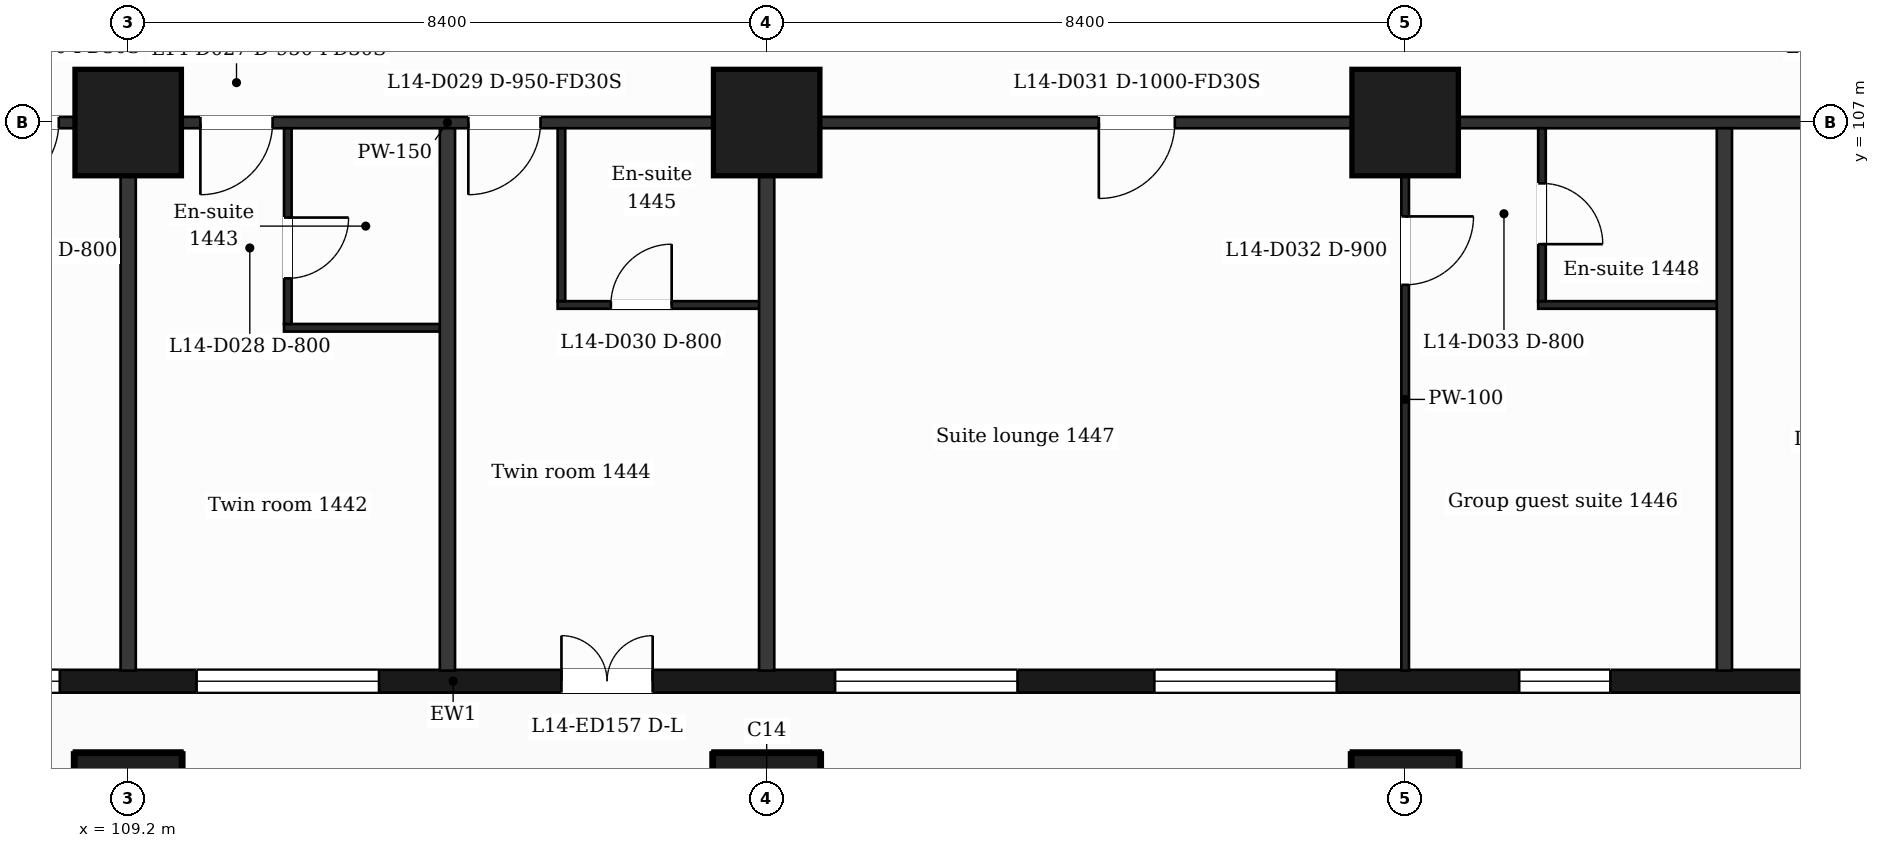
"""IFC4 building model, lengths in metres.
Left out: names, types, materials, properties, quantities, classifications, styles, units other than length and angle.
Written with IfcOpenShell. Run it as: python <this file> out.ifc"""

import sys

from ifc_helpers import new_model, si_unit, direction, frame, frame_2d, origin, origin_2d, place, context, subcontext, project, spatial, rectangle, extrude, element, fill, save


model = new_model("IFC4")
c1 = context("Model", 3, precision=1e-05, world=origin(), true_north=direction((0.0, 1.0)))
c2 = subcontext(c1, "Body", "Model", "MODEL_VIEW")
j1 = project(units=[si_unit("LENGTHUNIT", "METRE"), si_unit("PLANEANGLEUNIT", "RADIAN")], contexts=[c1])
p1 = place(None, origin())
s1 = spatial("IfcSite", under=j1, at=p1, CompositionType="ELEMENT")
p2 = place(p1, origin())
s2 = spatial("IfcBuilding", under=s1, at=p2, CompositionType="ELEMENT")
p3 = place(p2, frame((0.0, 0.0, 67.0)))
s3 = spatial("IfcBuildingStorey", under=s2, at=p3, CompositionType="ELEMENT", Elevation=67.0)
for number, where, z_axis, x_axis in (
    (1, (109.2, 98.0, 0.0), (0.0, 0.0, 1.0), (1.0, 0.0, 0.0)),
    (2, (117.6, 98.0, 0.0), (0.0, 0.0, 1.0), (1.0, 0.0, 0.0)),
    (3, (126.0, 98.0, 0.0), (0.0, 0.0, 1.0), (1.0, 0.0, 0.0)),
    (4, (109.2, 107.0, 0.0), (0.0, 0.0, 1.0), (1.0, 0.0, 0.0)),
    (5, (117.6, 107.0, 0.0), (0.0, 0.0, 1.0), (1.0, 0.0, 0.0)),
    (6, (126.0, 107.0, 0.0), (0.0, 0.0, 1.0), (1.0, 0.0, 0.0)),
):
    element("IfcColumn", number, at=place(p3, frame(where, z_axis=z_axis, x_axis=x_axis)), inside=s3, PredefinedType="COLUMN", context=c2, shape_type="SweptSolid", body=[
        extrude(rectangle(XDim=1.4, YDim=1.4, at=origin_2d()), origin(), (0.0, 0.0, 1.0), 3.5),
    ])
p4 = place(p3, frame((89.85, 99.65, 0.0), z_axis=(0.0, 0.0, 1.0), x_axis=(1.0, 0.0, 0.0)))
e7 = element("IfcWall", 7, at=p4, inside=s3, PredefinedType="SOLIDWALL", context=c2, shape_type="SweptSolid", body=[
    extrude(rectangle(XDim=47.25, YDim=0.3, at=frame_2d((23.625, 0.0))), origin(), (0.0, 0.0, 1.0), 3.18),
])
p5 = place(p4, frame((0.725, 0.0, 0.9)))
e8 = element("IfcOpeningElement", 8, at=p5, cuts=e7, PredefinedType="OPENING", context=c2, shape_type="SweptSolid", body=[
    extrude(rectangle(XDim=1.2, YDim=2.1, at=frame_2d((0.6, 1.05))), frame((0.0, 0.16, 0.0), z_axis=(0.0, -1.0, 0.0), x_axis=(1.0, 0.0, 0.0)), (0.0, 0.0, 1.0), 0.32),
])
p6 = place(p4, frame((3.45, 0.0, 0.9)))
e9 = element("IfcOpeningElement", 9, at=p6, cuts=e7, PredefinedType="OPENING", context=c2, shape_type="SweptSolid", body=[
    extrude(rectangle(XDim=2.4, YDim=2.1, at=frame_2d((1.2, 1.05))), frame((0.0, 0.16, 0.0), z_axis=(0.0, -1.0, 0.0), x_axis=(1.0, 0.0, 0.0)), (0.0, 0.0, 1.0), 0.32),
])
p7 = place(p4, frame((8.25, 0.0, 0.9)))
e10 = element("IfcOpeningElement", 10, at=p7, cuts=e7, PredefinedType="OPENING", context=c2, shape_type="SweptSolid", body=[
    extrude(rectangle(XDim=1.2, YDim=2.1, at=frame_2d((0.6, 1.05))), frame((0.0, 0.16, 0.0), z_axis=(0.0, -1.0, 0.0), x_axis=(1.0, 0.0, 0.0)), (0.0, 0.0, 1.0), 0.32),
])
p8 = place(p4, frame((12.45, 0.0, 0.9)))
e11 = element("IfcOpeningElement", 11, at=p8, cuts=e7, PredefinedType="OPENING", context=c2, shape_type="SweptSolid", body=[
    extrude(rectangle(XDim=1.2, YDim=2.1, at=frame_2d((0.6, 1.05))), frame((0.0, 0.16, 0.0), z_axis=(0.0, -1.0, 0.0), x_axis=(1.0, 0.0, 0.0)), (0.0, 0.0, 1.0), 0.32),
])
p9 = place(p4, frame((16.05, 0.0, 0.9)))
e12 = element("IfcOpeningElement", 12, at=p9, cuts=e7, PredefinedType="OPENING", context=c2, shape_type="SweptSolid", body=[
    extrude(rectangle(XDim=2.4, YDim=2.1, at=frame_2d((1.2, 1.05))), frame((0.0, 0.16, 0.0), z_axis=(0.0, -1.0, 0.0), x_axis=(1.0, 0.0, 0.0)), (0.0, 0.0, 1.0), 0.32),
])
p10 = place(p4, frame((20.25, 0.0, 0.9)))
e13 = element("IfcOpeningElement", 13, at=p10, cuts=e7, PredefinedType="OPENING", context=c2, shape_type="SweptSolid", body=[
    extrude(rectangle(XDim=2.4, YDim=2.1, at=frame_2d((1.2, 1.05))), frame((0.0, 0.16, 0.0), z_axis=(0.0, -1.0, 0.0), x_axis=(1.0, 0.0, 0.0)), (0.0, 0.0, 1.0), 0.32),
])
p11 = place(p4, frame((25.05, 0.0, 0.0)))
e14 = element("IfcOpeningElement", 14, at=p11, cuts=e7, PredefinedType="OPENING", context=c2, shape_type="SweptSolid", body=[
    extrude(rectangle(XDim=1.2, YDim=2.4, at=frame_2d((0.6, 1.2))), frame((0.0, 0.16, 0.0), z_axis=(0.0, -1.0, 0.0), x_axis=(1.0, 0.0, 0.0)), (0.0, 0.0, 1.0), 0.32),
])
p12 = place(p4, frame((28.65, 0.0, 0.9)))
e15 = element("IfcOpeningElement", 15, at=p12, cuts=e7, PredefinedType="OPENING", context=c2, shape_type="SweptSolid", body=[
    extrude(rectangle(XDim=2.4, YDim=2.1, at=frame_2d((1.2, 1.05))), frame((0.0, 0.16, 0.0), z_axis=(0.0, -1.0, 0.0), x_axis=(1.0, 0.0, 0.0)), (0.0, 0.0, 1.0), 0.32),
])
p13 = place(p4, frame((32.85, 0.0, 0.9)))
e16 = element("IfcOpeningElement", 16, at=p13, cuts=e7, PredefinedType="OPENING", context=c2, shape_type="SweptSolid", body=[
    extrude(rectangle(XDim=2.4, YDim=2.1, at=frame_2d((1.2, 1.05))), frame((0.0, 0.16, 0.0), z_axis=(0.0, -1.0, 0.0), x_axis=(1.0, 0.0, 0.0)), (0.0, 0.0, 1.0), 0.32),
])
p14 = place(p4, frame((37.65, 0.0, 0.9)))
e17 = element("IfcOpeningElement", 17, at=p14, cuts=e7, PredefinedType="OPENING", context=c2, shape_type="SweptSolid", body=[
    extrude(rectangle(XDim=1.2, YDim=2.1, at=frame_2d((0.6, 1.05))), frame((0.0, 0.16, 0.0), z_axis=(0.0, -1.0, 0.0), x_axis=(1.0, 0.0, 0.0)), (0.0, 0.0, 1.0), 0.32),
])
p15 = place(p4, frame((41.85, 0.0, 0.9)))
e18 = element("IfcOpeningElement", 18, at=p15, cuts=e7, PredefinedType="OPENING", context=c2, shape_type="SweptSolid", body=[
    extrude(rectangle(XDim=1.2, YDim=2.1, at=frame_2d((0.6, 1.05))), frame((0.0, 0.16, 0.0), z_axis=(0.0, -1.0, 0.0), x_axis=(1.0, 0.0, 0.0)), (0.0, 0.0, 1.0), 0.32),
])
p16 = place(p4, frame((45.25, 0.0, 0.9)))
e19 = element("IfcOpeningElement", 19, at=p16, cuts=e7, PredefinedType="OPENING", context=c2, shape_type="SweptSolid", body=[
    extrude(rectangle(XDim=1.2, YDim=2.1, at=frame_2d((0.6, 1.05))), frame((0.0, 0.16, 0.0), z_axis=(0.0, -1.0, 0.0), x_axis=(1.0, 0.0, 0.0)), (0.0, 0.0, 1.0), 0.32),
])
p17 = place(p3, frame((111.25, 104.3, 0.0), z_axis=(0.0, 0.0, 1.0), x_axis=(1.0, 0.0, 0.0)))
e20 = element("IfcWall", 20, at=p17, inside=s3, PredefinedType="PARTITIONING", context=c2, shape_type="SweptSolid", body=[
    extrude(rectangle(XDim=2.15, YDim=0.1, at=frame_2d((1.075, 0.0))), origin(), (0.0, 0.0, 1.0), 3.18),
])
p18 = place(p3, frame((114.85, 104.6, 0.0), z_axis=(0.0, 0.0, 1.0), x_axis=(1.0, 0.0, 0.0)))
e21 = element("IfcWall", 21, at=p18, inside=s3, PredefinedType="PARTITIONING", context=c2, shape_type="SweptSolid", body=[
    extrude(rectangle(XDim=2.75, YDim=0.1, at=frame_2d((1.375, 0.0))), origin(), (0.0, 0.0, 1.0), 3.18),
])
p19 = place(p18, frame((0.7, 0.0, 0.0)))
e22 = element("IfcOpeningElement", 22, at=p19, cuts=e21, PredefinedType="OPENING", context=c2, shape_type="SweptSolid", body=[
    extrude(rectangle(XDim=0.8, YDim=2.1, at=frame_2d((0.4, 1.05))), frame((0.0, 0.06, 0.0), z_axis=(0.0, -1.0, 0.0), x_axis=(1.0, 0.0, 0.0)), (0.0, 0.0, 1.0), 0.12),
])
p20 = place(p3, frame((127.75, 104.6, 0.0), z_axis=(0.0, 0.0, 1.0), x_axis=(1.0, 0.0, 0.0)))
e23 = element("IfcWall", 23, at=p20, inside=s3, PredefinedType="PARTITIONING", context=c2, shape_type="SweptSolid", body=[
    extrude(rectangle(XDim=2.45, YDim=0.1, at=frame_2d((1.225, 0.0))), origin(), (0.0, 0.0, 1.0), 3.18),
])
p21 = place(p3, frame((87.018, 107.0, 0.0), z_axis=(0.0, 0.0, 1.0), x_axis=(1.0, 0.0, 0.0)))
e24 = element("IfcWall", 24, at=p21, inside=s3, PredefinedType="PARTITIONING", context=c2, shape_type="SweptSolid", body=[
    extrude(rectangle(XDim=52.765, YDim=0.15, at=frame_2d((26.382, 0.0))), origin(), (0.0, 0.0, 1.0), 3.18),
])
p22 = place(p21, frame((0.87, 0.0, 0.0)))
e25 = element("IfcOpeningElement", 25, at=p22, cuts=e24, PredefinedType="OPENING", context=c2, shape_type="SweptSolid", body=[
    extrude(rectangle(XDim=0.95, YDim=2.1, at=frame_2d((0.475, 1.05))), frame((0.0, 0.085, 0.0), z_axis=(0.0, -1.0, 0.0), x_axis=(1.0, 0.0, 0.0)), (0.0, 0.0, 1.0), 0.17),
])
p23 = place(p21, frame((6.332, 0.0, 0.0)))
e26 = element("IfcOpeningElement", 26, at=p23, cuts=e24, PredefinedType="OPENING", context=c2, shape_type="SweptSolid", body=[
    extrude(rectangle(XDim=0.95, YDim=2.1, at=frame_2d((0.475, 1.05))), frame((0.0, 0.085, 0.0), z_axis=(0.0, -1.0, 0.0), x_axis=(1.0, 0.0, 0.0)), (0.0, 0.0, 1.0), 0.17),
])
p24 = place(p21, frame((11.882, 0.0, 0.0)))
e27 = element("IfcOpeningElement", 27, at=p24, cuts=e24, PredefinedType="OPENING", context=c2, shape_type="SweptSolid", body=[
    extrude(rectangle(XDim=0.95, YDim=2.1, at=frame_2d((0.475, 1.05))), frame((0.0, 0.085, 0.0), z_axis=(0.0, -1.0, 0.0), x_axis=(1.0, 0.0, 0.0)), (0.0, 0.0, 1.0), 0.17),
])
p25 = place(p21, frame((16.757, 0.0, 0.0)))
e28 = element("IfcOpeningElement", 28, at=p25, cuts=e24, PredefinedType="OPENING", context=c2, shape_type="SweptSolid", body=[
    extrude(rectangle(XDim=0.95, YDim=2.1, at=frame_2d((0.475, 1.05))), frame((0.0, 0.085, 0.0), z_axis=(0.0, -1.0, 0.0), x_axis=(1.0, 0.0, 0.0)), (0.0, 0.0, 1.0), 0.17),
])
p26 = place(p21, frame((20.319, 0.0, 0.0)))
e29 = element("IfcOpeningElement", 29, at=p26, cuts=e24, PredefinedType="OPENING", context=c2, shape_type="SweptSolid", body=[
    extrude(rectangle(XDim=0.95, YDim=2.1, at=frame_2d((0.475, 1.05))), frame((0.0, 0.085, 0.0), z_axis=(0.0, -1.0, 0.0), x_axis=(1.0, 0.0, 0.0)), (0.0, 0.0, 1.0), 0.17),
])
p27 = place(p21, frame((23.132, 0.0, 0.0)))
e30 = element("IfcOpeningElement", 30, at=p27, cuts=e24, PredefinedType="OPENING", context=c2, shape_type="SweptSolid", body=[
    extrude(rectangle(XDim=0.95, YDim=2.1, at=frame_2d((0.475, 1.05))), frame((0.0, 0.085, 0.0), z_axis=(0.0, -1.0, 0.0), x_axis=(1.0, 0.0, 0.0)), (0.0, 0.0, 1.0), 0.17),
])
p28 = place(p21, frame((26.657, 0.0, 0.0)))
e31 = element("IfcOpeningElement", 31, at=p28, cuts=e24, PredefinedType="OPENING", context=c2, shape_type="SweptSolid", body=[
    extrude(rectangle(XDim=0.95, YDim=2.1, at=frame_2d((0.475, 1.05))), frame((0.0, 0.085, 0.0), z_axis=(0.0, -1.0, 0.0), x_axis=(1.0, 0.0, 0.0)), (0.0, 0.0, 1.0), 0.17),
])
p29 = place(p21, frame((34.952, 0.0, 0.0)))
e32 = element("IfcOpeningElement", 32, at=p29, cuts=e24, PredefinedType="OPENING", context=c2, shape_type="SweptSolid", body=[
    extrude(rectangle(XDim=1.0, YDim=2.1, at=frame_2d((0.5, 1.05))), frame((0.0, 0.085, 0.0), z_axis=(0.0, -1.0, 0.0), x_axis=(1.0, 0.0, 0.0)), (0.0, 0.0, 1.0), 0.17),
])
p30 = place(p21, frame((45.062, 0.0, 0.0)))
e33 = element("IfcOpeningElement", 33, at=p30, cuts=e24, PredefinedType="OPENING", context=c2, shape_type="SweptSolid", body=[
    extrude(rectangle(XDim=0.95, YDim=2.1, at=frame_2d((0.475, 1.05))), frame((0.0, 0.085, 0.0), z_axis=(0.0, -1.0, 0.0), x_axis=(1.0, 0.0, 0.0)), (0.0, 0.0, 1.0), 0.17),
])
p31 = place(p21, frame((49.285, 0.0, 0.0)))
e34 = element("IfcOpeningElement", 34, at=p31, cuts=e24, PredefinedType="OPENING", context=c2, shape_type="SweptSolid", body=[
    extrude(rectangle(XDim=0.95, YDim=2.1, at=frame_2d((0.475, 1.05))), frame((0.0, 0.085, 0.0), z_axis=(0.0, -1.0, 0.0), x_axis=(1.0, 0.0, 0.0)), (0.0, 0.0, 1.0), 0.17),
])
p32 = place(p3, frame((109.2, 99.79, 0.0), z_axis=(0.0, 0.0, 1.0), x_axis=(0.0, 1.0, 0.0)))
e35 = element("IfcWall", 35, at=p32, inside=s3, PredefinedType="PARTITIONING", context=c2, shape_type="SweptSolid", body=[
    extrude(rectangle(XDim=7.135, YDim=0.2, at=frame_2d((3.567, 0.0))), origin(), (0.0, 0.0, 1.0), 3.18),
])
p33 = place(p3, frame((111.3, 104.35, 0.0), z_axis=(0.0, 0.0, 1.0), x_axis=(0.0, 1.0, 0.0)))
e36 = element("IfcWall", 36, at=p33, inside=s3, PredefinedType="PARTITIONING", context=c2, shape_type="SweptSolid", body=[
    extrude(rectangle(XDim=2.575, YDim=0.1, at=frame_2d((1.288, 0.0))), origin(), (0.0, 0.0, 1.0), 3.18),
])
p34 = place(p33, frame((0.6, 0.0, 0.0)))
e37 = element("IfcOpeningElement", 37, at=p34, cuts=e36, PredefinedType="OPENING", context=c2, shape_type="SweptSolid", body=[
    extrude(rectangle(XDim=0.8, YDim=2.1, at=frame_2d((0.4, 1.05))), frame((0.0, 0.06, 0.0), z_axis=(0.0, -1.0, 0.0), x_axis=(1.0, 0.0, 0.0)), (0.0, 0.0, 1.0), 0.12),
])
p35 = place(p3, frame((113.4, 99.79, 0.0), z_axis=(0.0, 0.0, 1.0), x_axis=(0.0, 1.0, 0.0)))
e38 = element("IfcWall", 38, at=p35, inside=s3, PredefinedType="PARTITIONING", context=c2, shape_type="SweptSolid", body=[
    extrude(rectangle(XDim=7.135, YDim=0.2, at=frame_2d((3.567, 0.0))), origin(), (0.0, 0.0, 1.0), 3.18),
])
p36 = place(p3, frame((114.9, 104.65, 0.0), z_axis=(0.0, 0.0, 1.0), x_axis=(0.0, 1.0, 0.0)))
e39 = element("IfcWall", 39, at=p36, inside=s3, PredefinedType="PARTITIONING", context=c2, shape_type="SweptSolid", body=[
    extrude(rectangle(XDim=2.275, YDim=0.1, at=frame_2d((1.138, 0.0))), origin(), (0.0, 0.0, 1.0), 3.18),
])
p37 = place(p3, frame((117.6, 99.79, 0.0), z_axis=(0.0, 0.0, 1.0), x_axis=(0.0, 1.0, 0.0)))
e40 = element("IfcWall", 40, at=p37, inside=s3, PredefinedType="PARTITIONING", context=c2, shape_type="SweptSolid", body=[
    extrude(rectangle(XDim=7.135, YDim=0.2, at=frame_2d((3.567, 0.0))), origin(), (0.0, 0.0, 1.0), 3.18),
])
p38 = place(p3, frame((126.0, 99.79, 0.0), z_axis=(0.0, 0.0, 1.0), x_axis=(0.0, 1.0, 0.0)))
e41 = element("IfcWall", 41, at=p38, inside=s3, PredefinedType="PARTITIONING", context=c2, shape_type="SweptSolid", body=[
    extrude(rectangle(XDim=7.135, YDim=0.1, at=frame_2d((3.567, 0.0))), origin(), (0.0, 0.0, 1.0), 3.18),
])
p39 = place(p38, frame((5.075, 0.0, 0.0)))
e42 = element("IfcOpeningElement", 42, at=p39, cuts=e41, PredefinedType="OPENING", context=c2, shape_type="SweptSolid", body=[
    extrude(rectangle(XDim=0.9, YDim=2.1, at=frame_2d((0.45, 1.05))), frame((0.0, 0.06, 0.0), z_axis=(0.0, -1.0, 0.0), x_axis=(1.0, 0.0, 0.0)), (0.0, 0.0, 1.0), 0.12),
])
p40 = place(p3, frame((127.8, 104.65, 0.0), z_axis=(0.0, 0.0, 1.0), x_axis=(0.0, 1.0, 0.0)))
e43 = element("IfcWall", 43, at=p40, inside=s3, PredefinedType="PARTITIONING", context=c2, shape_type="SweptSolid", body=[
    extrude(rectangle(XDim=2.275, YDim=0.1, at=frame_2d((1.138, 0.0))), origin(), (0.0, 0.0, 1.0), 3.18),
])
p41 = place(p40, frame((0.75, 0.0, 0.0)))
e44 = element("IfcOpeningElement", 44, at=p41, cuts=e43, PredefinedType="OPENING", context=c2, shape_type="SweptSolid", body=[
    extrude(rectangle(XDim=0.8, YDim=2.1, at=frame_2d((0.4, 1.05))), frame((0.0, 0.06, 0.0), z_axis=(0.0, -1.0, 0.0), x_axis=(1.0, 0.0, 0.0)), (0.0, 0.0, 1.0), 0.12),
])
p42 = place(p3, frame((130.2, 99.79, 0.0), z_axis=(0.0, 0.0, 1.0), x_axis=(0.0, 1.0, 0.0)))
e45 = element("IfcWall", 45, at=p42, inside=s3, PredefinedType="PARTITIONING", context=c2, shape_type="SweptSolid", body=[
    extrude(rectangle(XDim=7.135, YDim=0.2, at=frame_2d((3.567, 0.0))), origin(), (0.0, 0.0, 1.0), 3.18),
])
p43 = place(p9, origin())
e46 = element("IfcWindow", 46, at=p43, inside=s3, PartitioningType="SINGLE_PANEL", PredefinedType="WINDOW", context=c2, shape_type="SweptSolid", body=[
    extrude(rectangle(XDim=2.4, YDim=2.1, at=frame_2d((1.2, 1.05))), frame((0.0, 0.03, 0.0), z_axis=(0.0, -1.0, 0.0), x_axis=(1.0, 0.0, 0.0)), (0.0, 0.0, 1.0), 0.06),
])
fill(e12, e46)
p44 = place(p10, origin())
e47 = element("IfcWindow", 47, at=p44, inside=s3, PartitioningType="SINGLE_PANEL", PredefinedType="WINDOW", context=c2, shape_type="SweptSolid", body=[
    extrude(rectangle(XDim=2.4, YDim=2.1, at=frame_2d((1.2, 1.05))), frame((0.0, 0.03, 0.0), z_axis=(0.0, -1.0, 0.0), x_axis=(1.0, 0.0, 0.0)), (0.0, 0.0, 1.0), 0.06),
])
fill(e13, e47)
p45 = place(p11, origin())
e48 = element("IfcDoor", 48, at=p45, inside=s3, OperationType="DOUBLE_DOOR_SINGLE_SWING", PredefinedType="DOOR", context=c2, shape_type="SweptSolid", body=[
    extrude(rectangle(XDim=1.2, YDim=2.4, at=frame_2d((0.6, 1.2))), frame((0.0, 0.025, 0.0), z_axis=(0.0, -1.0, 0.0), x_axis=(1.0, 0.0, 0.0)), (0.0, 0.0, 1.0), 0.05),
])
fill(e14, e48)
p46 = place(p12, origin())
e49 = element("IfcWindow", 49, at=p46, inside=s3, PartitioningType="SINGLE_PANEL", PredefinedType="WINDOW", context=c2, shape_type="SweptSolid", body=[
    extrude(rectangle(XDim=2.4, YDim=2.1, at=frame_2d((1.2, 1.05))), frame((0.0, 0.03, 0.0), z_axis=(0.0, -1.0, 0.0), x_axis=(1.0, 0.0, 0.0)), (0.0, 0.0, 1.0), 0.06),
])
fill(e15, e49)
p47 = place(p13, origin())
e50 = element("IfcWindow", 50, at=p47, inside=s3, PartitioningType="SINGLE_PANEL", PredefinedType="WINDOW", context=c2, shape_type="SweptSolid", body=[
    extrude(rectangle(XDim=2.4, YDim=2.1, at=frame_2d((1.2, 1.05))), frame((0.0, 0.03, 0.0), z_axis=(0.0, -1.0, 0.0), x_axis=(1.0, 0.0, 0.0)), (0.0, 0.0, 1.0), 0.06),
])
fill(e16, e50)
p48 = place(p14, origin())
e51 = element("IfcWindow", 51, at=p48, inside=s3, PartitioningType="SINGLE_PANEL", PredefinedType="WINDOW", context=c2, shape_type="SweptSolid", body=[
    extrude(rectangle(XDim=1.2, YDim=2.1, at=frame_2d((0.6, 1.05))), frame((0.0, 0.03, 0.0), z_axis=(0.0, -1.0, 0.0), x_axis=(1.0, 0.0, 0.0)), (0.0, 0.0, 1.0), 0.06),
])
fill(e17, e51)
p49 = place(p26, origin())
e52 = element("IfcDoor", 52, at=p49, inside=s3, OperationType="SINGLE_SWING_LEFT", PredefinedType="DOOR", context=c2, shape_type="SweptSolid", body=[
    extrude(rectangle(XDim=0.95, YDim=2.1, at=frame_2d((0.475, 1.05))), frame((0.0, 0.025, 0.0), z_axis=(0.0, -1.0, 0.0), x_axis=(1.0, 0.0, 0.0)), (0.0, 0.0, 1.0), 0.05),
])
fill(e29, e52)
p50 = place(p27, origin())
e53 = element("IfcDoor", 53, at=p50, inside=s3, OperationType="SINGLE_SWING_LEFT", PredefinedType="DOOR", context=c2, shape_type="SweptSolid", body=[
    extrude(rectangle(XDim=0.95, YDim=2.1, at=frame_2d((0.475, 1.05))), frame((0.0, 0.025, 0.0), z_axis=(0.0, -1.0, 0.0), x_axis=(1.0, 0.0, 0.0)), (0.0, 0.0, 1.0), 0.05),
])
fill(e30, e53)
p51 = place(p34, origin())
e54 = element("IfcDoor", 54, at=p51, inside=s3, OperationType="SINGLE_SWING_RIGHT", PredefinedType="DOOR", context=c2, shape_type="SweptSolid", body=[
    extrude(rectangle(XDim=0.8, YDim=2.1, at=frame_2d((0.4, 1.05))), frame((0.0, 0.025, 0.0), z_axis=(0.0, -1.0, 0.0), x_axis=(1.0, 0.0, 0.0)), (0.0, 0.0, 1.0), 0.05),
])
fill(e37, e54)
p52 = place(p28, origin())
e55 = element("IfcDoor", 55, at=p52, inside=s3, OperationType="SINGLE_SWING_LEFT", PredefinedType="DOOR", context=c2, shape_type="SweptSolid", body=[
    extrude(rectangle(XDim=0.95, YDim=2.1, at=frame_2d((0.475, 1.05))), frame((0.0, 0.025, 0.0), z_axis=(0.0, -1.0, 0.0), x_axis=(1.0, 0.0, 0.0)), (0.0, 0.0, 1.0), 0.05),
])
fill(e31, e55)
p53 = place(p19, origin())
e56 = element("IfcDoor", 56, at=p53, inside=s3, OperationType="SINGLE_SWING_RIGHT", PredefinedType="DOOR", context=c2, shape_type="SweptSolid", body=[
    extrude(rectangle(XDim=0.8, YDim=2.1, at=frame_2d((0.4, 1.05))), frame((0.0, 0.025, 0.0), z_axis=(0.0, -1.0, 0.0), x_axis=(1.0, 0.0, 0.0)), (0.0, 0.0, 1.0), 0.05),
])
fill(e22, e56)
p54 = place(p29, origin())
e57 = element("IfcDoor", 57, at=p54, inside=s3, OperationType="SINGLE_SWING_LEFT", PredefinedType="DOOR", context=c2, shape_type="SweptSolid", body=[
    extrude(rectangle(XDim=1.0, YDim=2.1, at=frame_2d((0.5, 1.05))), frame((0.0, 0.025, 0.0), z_axis=(0.0, -1.0, 0.0), x_axis=(1.0, 0.0, 0.0)), (0.0, 0.0, 1.0), 0.05),
])
fill(e32, e57)
p55 = place(p39, origin())
e58 = element("IfcDoor", 58, at=p55, inside=s3, OperationType="SINGLE_SWING_RIGHT", PredefinedType="DOOR", context=c2, shape_type="SweptSolid", body=[
    extrude(rectangle(XDim=0.9, YDim=2.1, at=frame_2d((0.45, 1.05))), frame((0.0, 0.025, 0.0), z_axis=(0.0, -1.0, 0.0), x_axis=(1.0, 0.0, 0.0)), (0.0, 0.0, 1.0), 0.05),
])
fill(e42, e58)
p56 = place(p41, origin())
e59 = element("IfcDoor", 59, at=p56, inside=s3, OperationType="SINGLE_SWING_LEFT", PredefinedType="DOOR", context=c2, shape_type="SweptSolid", body=[
    extrude(rectangle(XDim=0.8, YDim=2.1, at=frame_2d((0.4, 1.05))), frame((0.0, 0.025, 0.0), z_axis=(0.0, -1.0, 0.0), x_axis=(1.0, 0.0, 0.0)), (0.0, 0.0, 1.0), 0.05),
])
fill(e44, e59)
save(model, sys.argv[1])
